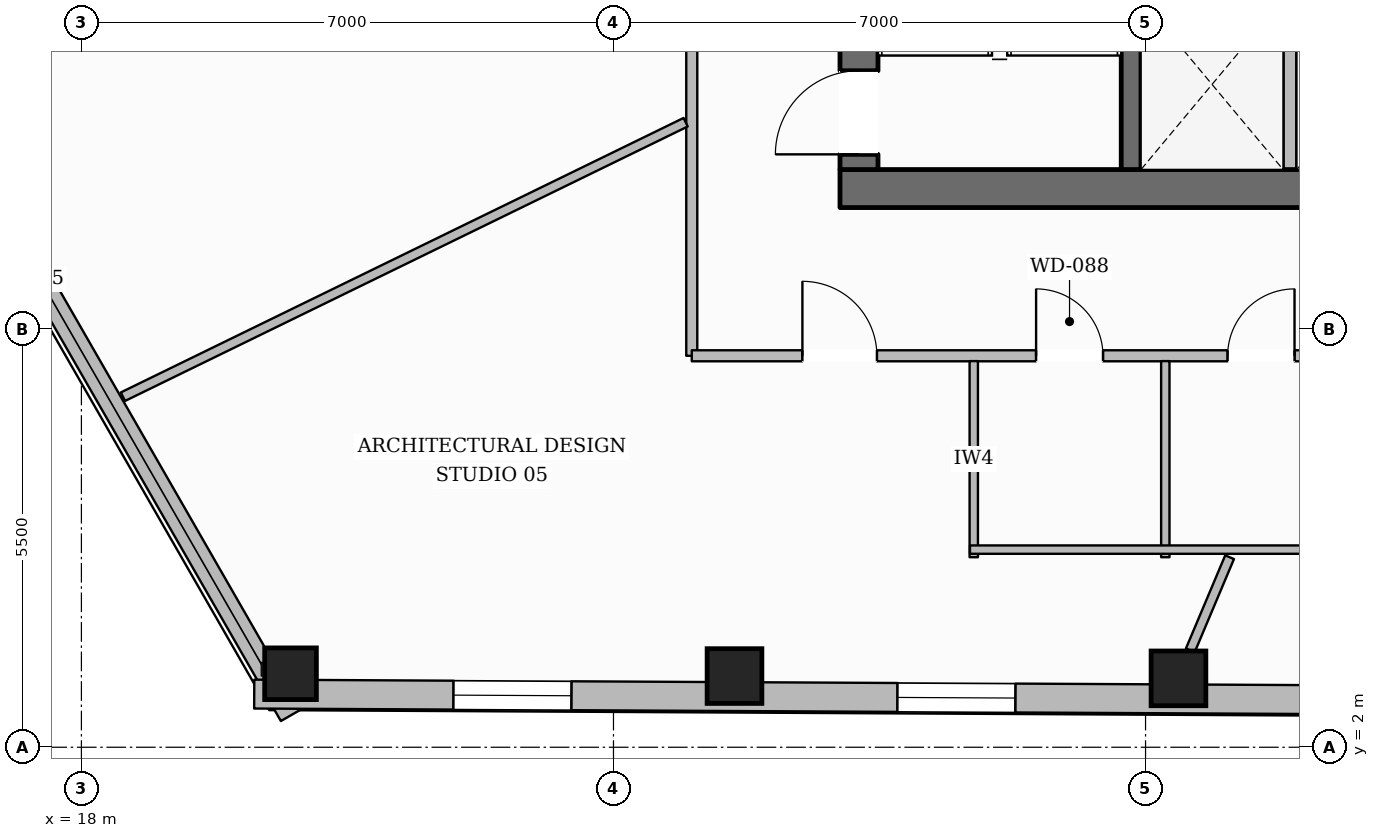
"""IFC4 building model, lengths in metres.
Left out: names, types, materials, properties, quantities, classifications, styles, units other than length and angle.
Written with IfcOpenShell. Run it as: python <this file> out.ifc"""

import sys

from ifc_helpers import new_model, si_unit, direction, frame, frame_2d, origin, origin_2d, place, context, subcontext, project, spatial, rectangle, hollow_rectangle, extrude, element, fill, save


model = new_model("IFC4")
c1 = context("Model", 3, precision=1e-05, world=origin(), true_north=direction((0.0, 1.0)))
c2 = subcontext(c1, "Body", "Model", "MODEL_VIEW")
j1 = project(units=[si_unit("LENGTHUNIT", "METRE"), si_unit("PLANEANGLEUNIT", "RADIAN")], contexts=[c1])
p1 = place(None, origin())
s1 = spatial("IfcSite", under=j1, at=p1, CompositionType="ELEMENT")
p2 = place(p1, origin())
s2 = spatial("IfcBuilding", under=s1, at=p2, CompositionType="ELEMENT")
p3 = place(p2, frame((0.0, 0.0, 100.9)))
s3 = spatial("IfcBuildingStorey", under=s2, at=p3, CompositionType="ELEMENT", Elevation=100.9)
p4 = place(p3, frame((27.98, 9.35, 0.0), z_axis=(0.0, 0.0, 1.0), x_axis=(1.0, 0.0, 0.0)))
e1 = element("IfcWall", 1, at=p4, inside=s3, PredefinedType="SOLIDWALL", context=c2, shape_type="SweptSolid", body=[
    extrude(rectangle(XDim=20.04, YDim=0.5, at=frame_2d((10.02, 0.0))), origin(), (0.0, 0.0, 1.0), 3.6),
])
p5 = place(p4, frame((10.52, 0.0, 0.0)))
e2 = element("IfcOpeningElement", 2, at=p5, cuts=e1, PredefinedType="OPENING", context=c2, shape_type="SweptSolid", body=[
    extrude(rectangle(XDim=1.4, YDim=2.2, at=frame_2d((0.7, 1.1))), frame((0.0, 0.26, 0.0), z_axis=(0.0, -1.0, 0.0), x_axis=(1.0, 0.0, 0.0)), (0.0, 0.0, 1.0), 0.52),
])
p6 = place(p3, frame((28.23, 9.6, 0.0), z_axis=(0.0, 0.0, 1.0), x_axis=(0.0, 1.0, 0.0)))
e3 = element("IfcWall", 3, at=p6, inside=s3, PredefinedType="SOLIDWALL", context=c2, shape_type="SweptSolid", body=[
    extrude(rectangle(XDim=13.0, YDim=0.5, at=frame_2d((6.5, 0.0))), origin(), (0.0, 0.0, 1.0), 3.6),
])
p7 = place(p6, frame((0.2, 0.0, 0.0)))
e4 = element("IfcOpeningElement", 4, at=p7, cuts=e3, PredefinedType="OPENING", context=c2, shape_type="SweptSolid", body=[
    extrude(rectangle(XDim=1.1, YDim=2.15, at=frame_2d((0.55, 1.075))), frame((0.0, 0.26, 0.0), z_axis=(0.0, -1.0, 0.0), x_axis=(1.0, 0.0, 0.0)), (0.0, 0.0, 1.0), 0.52),
])
p8 = place(p6, frame((8.4, 0.0, 0.0)))
e5 = element("IfcOpeningElement", 5, at=p8, cuts=e3, PredefinedType="OPENING", context=c2, shape_type="SweptSolid", body=[
    extrude(rectangle(XDim=0.9, YDim=2.1, at=frame_2d((0.45, 1.05))), frame((0.0, 0.26, 0.0), z_axis=(0.0, -1.0, 0.0), x_axis=(1.0, 0.0, 0.0)), (0.0, 0.0, 1.0), 0.52),
])
p9 = place(p3, frame((31.81, 9.6, 0.0), z_axis=(0.0, 0.0, 1.0), x_axis=(0.0, 1.0, 0.0)))
e6 = element("IfcWall", 6, at=p9, inside=s3, PredefinedType="SHEAR", context=c2, shape_type="SweptSolid", body=[
    extrude(rectangle(XDim=13.0, YDim=0.26, at=frame_2d((6.5, 0.0))), origin(), (0.0, 0.0, 1.0), 3.6),
])
p10 = place(p9, frame((10.925, 0.0, 0.0)))
e7 = element("IfcOpeningElement", 7, at=p10, cuts=e6, PredefinedType="OPENING", context=c2, shape_type="SweptSolid", body=[
    extrude(rectangle(XDim=1.25, YDim=2.25, at=frame_2d((0.625, 1.125))), frame((0.0, 0.14, 0.0), z_axis=(0.0, -1.0, 0.0), x_axis=(1.0, 0.0, 0.0)), (0.0, 0.0, 1.0), 0.28),
])
p11 = place(p3, frame((20.751, 2.967, 0.0), z_axis=(0.0, 0.0, 1.0), x_axis=(1.0, 0.0, 0.0)))
e8 = element("IfcColumn", 8, at=p11, inside=s3, PredefinedType="COLUMN", context=c2, shape_type="SweptSolid", body=[
    extrude(hollow_rectangle(XDim=0.68, YDim=0.68, WallThickness=0.03, at=origin_2d()), origin(), (0.0, 0.0, 1.0), 3.6),
])
for number, where, z_axis, x_axis in (
    (9, (26.592, 2.937, 0.0), (0.0, 0.0, 1.0), (1.0, 0.0, 0.0)),
    (10, (32.433, 2.906, 0.0), (0.0, 0.0, 1.0), (1.0, 0.0, 0.0)),
):
    element("IfcColumn", number, at=place(p3, frame(where, z_axis=z_axis, x_axis=x_axis)), inside=s3, PredefinedType="COLUMN", context=c2, shape_type="SweptSolid", body=[
        extrude(hollow_rectangle(XDim=0.72, YDim=0.72, WallThickness=0.032, at=origin_2d()), origin(), (0.0, 0.0, 1.0), 3.6),
    ])
p12 = place(p3, frame((20.754, 2.419, 0.0), z_axis=(0.0, 0.0, 1.0), x_axis=(-0.49837034912, 0.866964240969, 0.0)))
e11 = element("IfcWall", 11, at=p12, inside=s3, PredefinedType="STANDARD", context=c2, shape_type="SweptSolid", body=[
    extrude(rectangle(XDim=13.246, YDim=0.3, at=frame_2d((6.623, 0.0))), origin(), (0.0, 0.0, 1.0), 3.059),
])
p13 = place(p3, frame((56.277, 2.512, 0.0), z_axis=(0.0, 0.0, 1.0), x_axis=(-0.999986545033, 0.005187461141, 0.0)))
e12 = element("IfcWall", 12, at=p13, inside=s3, PredefinedType="STANDARD", context=c2, shape_type="SweptSolid", body=[
    extrude(rectangle(XDim=36.004, YDim=0.38, at=frame_2d((18.002, 0.0))), origin(), (0.0, 0.0, 1.0), 3.059),
])
p14 = place(p13, frame((31.832, 0.0, 0.65)))
e13 = element("IfcOpeningElement", 13, at=p14, cuts=e12, PredefinedType="OPENING", context=c2, shape_type="SweptSolid", body=[
    extrude(rectangle(XDim=1.55, YDim=1.75, at=frame_2d((0.775, 0.875))), frame((0.0, 0.2, 0.0), z_axis=(0.0, -1.0, 0.0), x_axis=(1.0, 0.0, 0.0)), (0.0, 0.0, 1.0), 0.4),
])
p15 = place(p13, frame((25.991, 0.0, 0.65)))
e14 = element("IfcOpeningElement", 14, at=p15, cuts=e12, PredefinedType="OPENING", context=c2, shape_type="SweptSolid", body=[
    extrude(rectangle(XDim=1.55, YDim=1.75, at=frame_2d((0.775, 0.875))), frame((0.0, 0.2, 0.0), z_axis=(0.0, -1.0, 0.0), x_axis=(1.0, 0.0, 0.0)), (0.0, 0.0, 1.0), 0.4),
])
p16 = place(p13, frame((14.309, 0.0, 0.65)))
e15 = element("IfcOpeningElement", 15, at=p16, cuts=e12, PredefinedType="OPENING", context=c2, shape_type="SweptSolid", body=[
    extrude(rectangle(XDim=1.55, YDim=1.75, at=frame_2d((0.775, 0.875))), frame((0.0, 0.2, 0.0), z_axis=(0.0, -1.0, 0.0), x_axis=(1.0, 0.0, 0.0)), (0.0, 0.0, 1.0), 0.4),
])
p17 = place(p13, frame((8.468, 0.0, 0.65)))
e16 = element("IfcOpeningElement", 16, at=p17, cuts=e12, PredefinedType="OPENING", context=c2, shape_type="SweptSolid", body=[
    extrude(rectangle(XDim=1.55, YDim=1.75, at=frame_2d((0.775, 0.875))), frame((0.0, 0.2, 0.0), z_axis=(0.0, -1.0, 0.0), x_axis=(1.0, 0.0, 0.0)), (0.0, 0.0, 1.0), 0.4),
])
p18 = place(p13, frame((2.627, 0.0, 0.65)))
e17 = element("IfcOpeningElement", 17, at=p18, cuts=e12, PredefinedType="OPENING", context=c2, shape_type="SweptSolid", body=[
    extrude(rectangle(XDim=1.55, YDim=1.75, at=frame_2d((0.775, 0.875))), frame((0.0, 0.2, 0.0), z_axis=(0.0, -1.0, 0.0), x_axis=(1.0, 0.0, 0.0)), (0.0, 0.0, 1.0), 0.4),
])
p19 = place(p3, frame((33.9, 9.55, 0.0), z_axis=(0.0, 0.0, 1.0), x_axis=(0.0, 1.0, 0.0)))
e18 = element("IfcWall", 18, at=p19, inside=s3, PredefinedType="PARTITIONING", context=c2, shape_type="SweptSolid", body=[
    extrude(rectangle(XDim=2.29, YDim=0.165, at=frame_2d((1.145, 0.0))), origin(), (0.0, 0.0, 1.0), 3.6),
])
p20 = place(p3, frame((26.03, 25.05, 0.0), z_axis=(0.0, 0.0, 1.0), x_axis=(0.0, -1.0, 0.0)))
e19 = element("IfcWall", 19, at=p20, inside=s3, PredefinedType="PARTITIONING", context=c2, shape_type="SweptSolid", body=[
    extrude(rectangle(XDim=17.9, YDim=0.145, at=frame_2d((8.95, 0.0))), origin(), (0.0, 0.0, 1.0), 3.288),
])
p21 = place(p20, frame((7.016, 0.0, 0.0)))
e20 = element("IfcOpeningElement", 20, at=p21, cuts=e19, PredefinedType="OPENING", context=c2, shape_type="SweptSolid", body=[
    extrude(rectangle(XDim=1.4, YDim=2.2, at=frame_2d((0.7, 1.1))), frame((0.0, 0.083, 0.0), z_axis=(0.0, -1.0, 0.0), x_axis=(1.0, 0.0, 0.0)), (0.0, 0.0, 1.0), 0.165),
])
p22 = place(p3, frame((26.03, 7.15, 0.0), z_axis=(0.0, 0.0, 1.0), x_axis=(1.0, 0.0, 0.0)))
e21 = element("IfcWall", 21, at=p22, inside=s3, PredefinedType="PARTITIONING", context=c2, shape_type="SweptSolid", body=[
    extrude(rectangle(XDim=23.94, YDim=0.145, at=frame_2d((11.97, 0.0))), origin(), (0.0, 0.0, 1.0), 3.6),
])
p23 = place(p22, frame((4.53, 0.0, 0.0)))
e22 = element("IfcOpeningElement", 22, at=p23, cuts=e21, PredefinedType="OPENING", context=c2, shape_type="SweptSolid", body=[
    extrude(rectangle(XDim=0.88, YDim=2.1, at=frame_2d((0.44, 1.05))), frame((0.0, 0.083, 0.0), z_axis=(0.0, -1.0, 0.0), x_axis=(1.0, 0.0, 0.0)), (0.0, 0.0, 1.0), 0.165),
])
p24 = place(p22, frame((7.05, 0.0, 0.0)))
e23 = element("IfcOpeningElement", 23, at=p24, cuts=e21, PredefinedType="OPENING", context=c2, shape_type="SweptSolid", body=[
    extrude(rectangle(XDim=0.88, YDim=2.1, at=frame_2d((0.44, 1.05))), frame((0.0, 0.083, 0.0), z_axis=(0.0, -1.0, 0.0), x_axis=(1.0, 0.0, 0.0)), (0.0, 0.0, 1.0), 0.165),
])
p25 = place(p22, frame((9.43, 0.0, 0.0)))
e24 = element("IfcOpeningElement", 24, at=p25, cuts=e21, PredefinedType="OPENING", context=c2, shape_type="SweptSolid", body=[
    extrude(rectangle(XDim=0.96, YDim=2.1, at=frame_2d((0.48, 1.05))), frame((0.0, 0.083, 0.0), z_axis=(0.0, -1.0, 0.0), x_axis=(1.0, 0.0, 0.0)), (0.0, 0.0, 1.0), 0.165),
])
p26 = place(p22, frame((1.456, 0.0, 0.0)))
e25 = element("IfcOpeningElement", 25, at=p26, cuts=e21, PredefinedType="OPENING", context=c2, shape_type="SweptSolid", body=[
    extrude(rectangle(XDim=0.98, YDim=2.15, at=frame_2d((0.49, 1.075))), frame((0.0, 0.083, 0.0), z_axis=(0.0, -1.0, 0.0), x_axis=(1.0, 0.0, 0.0)), (0.0, 0.0, 1.0), 0.165),
])
p27 = place(p22, frame((16.714, 0.0, 0.0)))
e26 = element("IfcOpeningElement", 26, at=p27, cuts=e21, PredefinedType="OPENING", context=c2, shape_type="SweptSolid", body=[
    extrude(rectangle(XDim=1.4, YDim=2.2, at=frame_2d((0.7, 1.1))), frame((0.0, 0.083, 0.0), z_axis=(0.0, -1.0, 0.0), x_axis=(1.0, 0.0, 0.0)), (0.0, 0.0, 1.0), 0.165),
])
p28 = place(p3, frame((29.74, 4.5, 0.0), z_axis=(0.0, 0.0, 1.0), x_axis=(0.0, 1.0, 0.0)))
e27 = element("IfcWall", 27, at=p28, inside=s3, PredefinedType="PLUMBINGWALL", context=c2, shape_type="SweptSolid", body=[
    extrude(rectangle(XDim=2.58, YDim=0.11, at=frame_2d((1.29, 0.0))), origin(), (0.0, 0.0, 1.0), 3.6),
])
p29 = place(p3, frame((32.26, 4.5, 0.0), z_axis=(0.0, 0.0, 1.0), x_axis=(0.0, 1.0, 0.0)))
e28 = element("IfcWall", 28, at=p29, inside=s3, PredefinedType="PLUMBINGWALL", context=c2, shape_type="SweptSolid", body=[
    extrude(rectangle(XDim=2.58, YDim=0.11, at=frame_2d((1.29, 0.0))), origin(), (0.0, 0.0, 1.0), 3.141),
])
p30 = place(p3, frame((29.69, 4.6, 0.0), z_axis=(0.0, 0.0, 1.0), x_axis=(1.0, 0.0, 0.0)))
e29 = element("IfcWall", 29, at=p30, inside=s3, PredefinedType="PLUMBINGWALL", context=c2, shape_type="SweptSolid", body=[
    extrude(rectangle(XDim=7.46, YDim=0.11, at=frame_2d((3.73, 0.0))), origin(), (0.0, 0.0, 1.0), 3.6),
])
p31 = place(p3, frame((25.949, 10.223, 0.0), z_axis=(0.0, 0.0, 1.0), x_axis=(-0.898788385453, -0.438382753054, 0.0)))
e30 = element("IfcWall", 30, at=p31, inside=s3, PredefinedType="PARTITIONING", context=c2, shape_type="SweptSolid", body=[
    extrude(rectangle(XDim=8.237, YDim=0.125, at=frame_2d((4.118, 0.0))), origin(), (0.0, 0.0, 1.0), 3.6),
])
p32 = place(p3, frame((33.106, 4.5, 0.0), z_axis=(0.0, 0.0, 1.0), x_axis=(-0.388819762507, -0.921313840276, 0.0)))
e31 = element("IfcWall", 31, at=p32, inside=s3, PredefinedType="PARTITIONING", context=c2, shape_type="SweptSolid", body=[
    extrude(rectangle(XDim=1.331, YDim=0.125, at=frame_2d((0.665, 0.0))), origin(), (0.0, 0.0, 1.0), 3.6),
])
p33 = place(p14, origin())
e32 = element("IfcWindow", 32, at=p33, inside=s3, PartitioningType="SINGLE_PANEL", PredefinedType="WINDOW", context=c2, shape_type="SweptSolid", body=[
    extrude(rectangle(XDim=1.55, YDim=1.75, at=frame_2d((0.775, 0.875))), frame((0.0, 0.03, 0.0), z_axis=(0.0, -1.0, 0.0), x_axis=(1.0, 0.0, 0.0)), (0.0, 0.0, 1.0), 0.06),
])
fill(e13, e32)
p34 = place(p15, origin())
e33 = element("IfcWindow", 33, at=p34, inside=s3, PartitioningType="SINGLE_PANEL", PredefinedType="WINDOW", context=c2, shape_type="SweptSolid", body=[
    extrude(rectangle(XDim=1.55, YDim=1.75, at=frame_2d((0.775, 0.875))), frame((0.0, 0.03, 0.0), z_axis=(0.0, -1.0, 0.0), x_axis=(1.0, 0.0, 0.0)), (0.0, 0.0, 1.0), 0.06),
])
fill(e14, e33)
p35 = place(p7, origin())
e34 = element("IfcDoor", 34, at=p35, inside=s3, OperationType="SINGLE_SWING_LEFT", PredefinedType="DOOR", context=c2, shape_type="SweptSolid", body=[
    extrude(rectangle(XDim=1.1, YDim=2.15, at=frame_2d((0.55, 1.075))), frame((0.0, 0.025, 0.0), z_axis=(0.0, -1.0, 0.0), x_axis=(1.0, 0.0, 0.0)), (0.0, 0.0, 1.0), 0.05),
])
fill(e4, e34)
p36 = place(p23, origin())
e35 = element("IfcDoor", 35, at=p36, inside=s3, OperationType="SINGLE_SWING_LEFT", PredefinedType="DOOR", context=c2, shape_type="SweptSolid", body=[
    extrude(rectangle(XDim=0.88, YDim=2.1, at=frame_2d((0.44, 1.05))), frame((0.0, 0.025, 0.0), z_axis=(0.0, -1.0, 0.0), x_axis=(1.0, 0.0, 0.0)), (0.0, 0.0, 1.0), 0.05),
])
fill(e22, e35)
p37 = place(p24, origin())
e36 = element("IfcDoor", 36, at=p37, inside=s3, OperationType="SINGLE_SWING_RIGHT", PredefinedType="DOOR", context=c2, shape_type="SweptSolid", body=[
    extrude(rectangle(XDim=0.88, YDim=2.1, at=frame_2d((0.44, 1.05))), frame((0.0, 0.025, 0.0), z_axis=(0.0, -1.0, 0.0), x_axis=(1.0, 0.0, 0.0)), (0.0, 0.0, 1.0), 0.05),
])
fill(e23, e36)
p38 = place(p26, origin())
e37 = element("IfcDoor", 37, at=p38, inside=s3, OperationType="SINGLE_SWING_LEFT", PredefinedType="DOOR", context=c2, shape_type="SweptSolid", body=[
    extrude(rectangle(XDim=0.98, YDim=2.15, at=frame_2d((0.49, 1.075))), frame((0.0, 0.025, 0.0), z_axis=(0.0, -1.0, 0.0), x_axis=(1.0, 0.0, 0.0)), (0.0, 0.0, 1.0), 0.05),
])
fill(e25, e37)
save(model, sys.argv[1])
